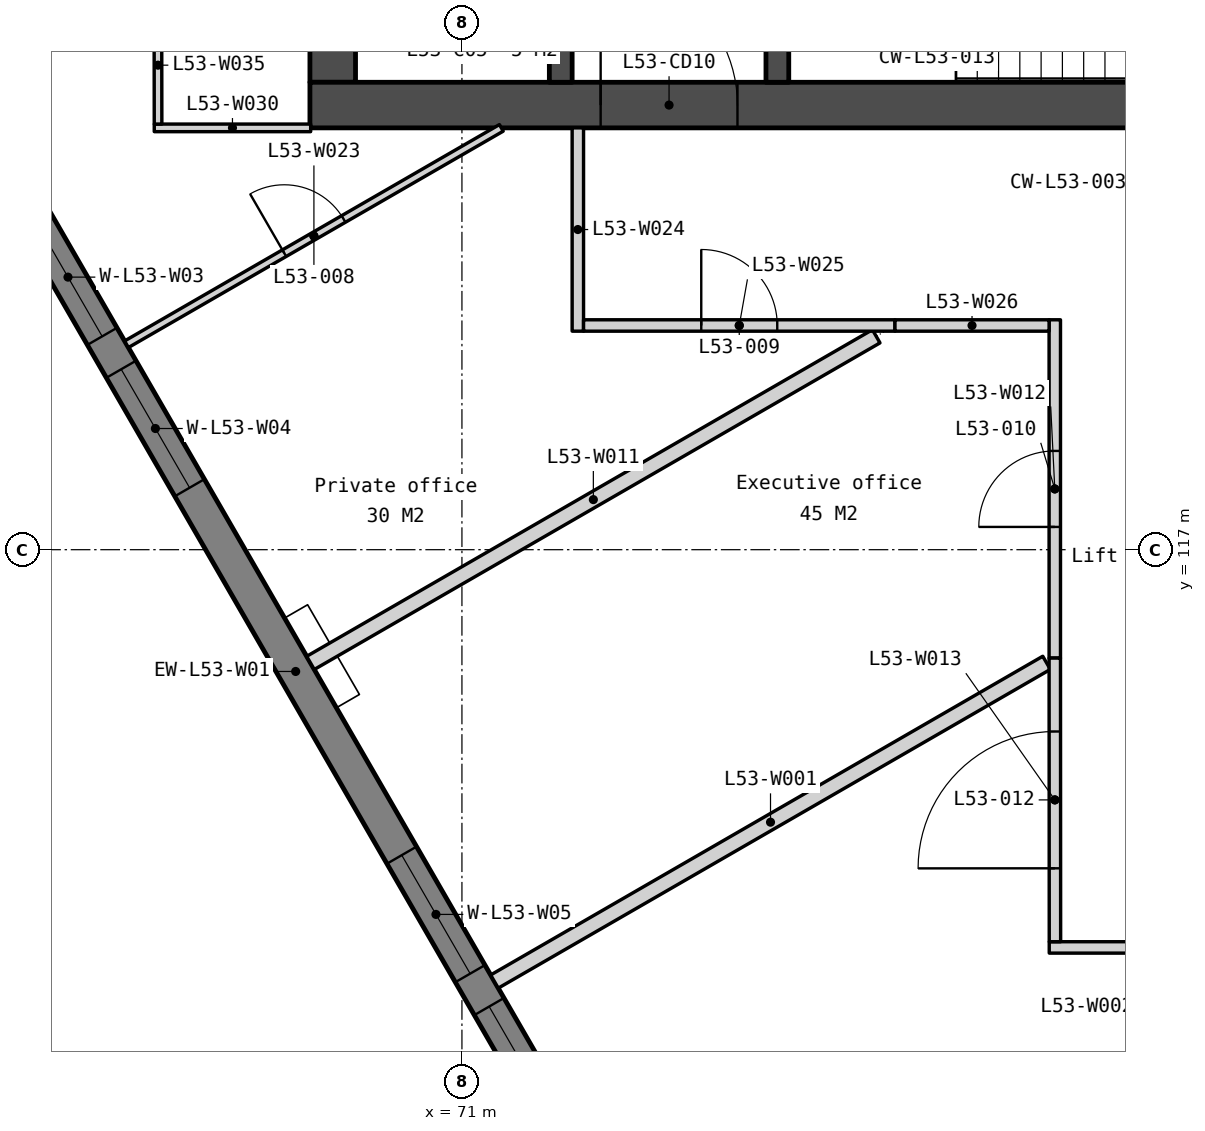
"""IFC4 building model, lengths in metres.
Left out: names, types, materials, properties, quantities, classifications, styles, units other than length and angle.
Written with IfcOpenShell. Run it as: python <this file> out.ifc"""

import sys

from ifc_helpers import new_model, si_unit, direction, frame, frame_2d, origin, place, context, subcontext, project, spatial, polyline, rectangle, outline, extrude, element, fill, save


model = new_model("IFC4")
c1 = context("Model", 3, precision=1e-05, world=origin(), true_north=direction((0.0, 1.0)))
c2 = subcontext(c1, "Body", "Model", "MODEL_VIEW")
j1 = project(units=[si_unit("LENGTHUNIT", "METRE"), si_unit("PLANEANGLEUNIT", "RADIAN")], contexts=[c1])
p1 = place(None, origin())
s1 = spatial("IfcSite", under=j1, at=p1, CompositionType="ELEMENT")
p2 = place(p1, origin())
s2 = spatial("IfcBuilding", under=s1, at=p2, CompositionType="ELEMENT")
p3 = place(p2, frame((0.0, 0.0, 211.4)))
s3 = spatial("IfcBuildingStorey", under=s2, at=p3, CompositionType="ELEMENT", Elevation=211.4)
p4 = place(p3, frame((69.3, 133.95, 0.0), z_axis=(0.0, 0.0, 1.0), x_axis=(0.0, -1.0, 0.0)))
e1 = element("IfcWall", 1, at=p4, inside=s3, PredefinedType="SOLIDWALL", context=c2, shape_type="SweptSolid", body=[
    extrude(rectangle(XDim=10.8, YDim=0.6, at=frame_2d((5.4, 0.0))), origin(), (0.0, 0.0, 1.0), 3.75),
])
p5 = place(p3, frame((69.0, 122.85, 0.0), z_axis=(0.0, 0.0, 1.0), x_axis=(1.0, 0.0, 0.0)))
e2 = element("IfcWall", 2, at=p5, inside=s3, PredefinedType="SOLIDWALL", context=c2, shape_type="SweptSolid", body=[
    extrude(rectangle(XDim=22.0, YDim=0.6, at=frame_2d((11.0, 0.0))), origin(), (0.0, 0.0, 1.0), 3.75),
])
p6 = place(p5, frame((16.375, 0.0, 0.0)))
e3 = element("IfcOpeningElement", 3, at=p6, cuts=e2, PredefinedType="OPENING", context=c2, shape_type="SweptSolid", body=[
    extrude(rectangle(XDim=1.8, YDim=2.1, at=frame_2d((0.9, 1.05))), frame((0.0, 0.31, 0.0), z_axis=(0.0, -1.0, 0.0), x_axis=(1.0, 0.0, 0.0)), (0.0, 0.0, 1.0), 0.62),
])
p7 = place(p5, frame((3.825, 0.0, 0.0)))
e4 = element("IfcOpeningElement", 4, at=p7, cuts=e2, PredefinedType="OPENING", context=c2, shape_type="SweptSolid", body=[
    extrude(rectangle(XDim=1.8, YDim=2.1, at=frame_2d((0.9, 1.05))), frame((0.0, 0.31, 0.0), z_axis=(0.0, -1.0, 0.0), x_axis=(1.0, 0.0, 0.0)), (0.0, 0.0, 1.0), 0.62),
])
p8 = place(p5, frame((12.85, 0.0, 0.0)))
e5 = element("IfcOpeningElement", 5, at=p8, cuts=e2, PredefinedType="OPENING", context=c2, shape_type="SweptSolid", body=[
    extrude(rectangle(XDim=1.5, YDim=2.1, at=frame_2d((0.75, 1.05))), frame((0.0, 0.31, 0.0), z_axis=(0.0, -1.0, 0.0), x_axis=(1.0, 0.0, 0.0)), (0.0, 0.0, 1.0), 0.62),
])
p9 = place(p3, frame((72.3, 133.95, 0.0), z_axis=(0.0, 0.0, 1.0), x_axis=(0.0, -1.0, 0.0)))
e6 = element("IfcWall", 6, at=p9, inside=s3, PredefinedType="SOLIDWALL", context=c2, shape_type="SweptSolid", body=[
    extrude(rectangle(XDim=10.8, YDim=0.3, at=frame_2d((5.4, 0.0))), origin(), (0.0, 0.0, 1.0), 3.75),
])
p10 = place(p9, frame((6.95, 0.0, 0.0)))
e7 = element("IfcOpeningElement", 7, at=p10, cuts=e6, PredefinedType="OPENING", context=c2, shape_type="SweptSolid", body=[
    extrude(rectangle(XDim=1.1, YDim=2.1, at=frame_2d((0.55, 1.05))), frame((0.0, 0.16, 0.0), z_axis=(0.0, -1.0, 0.0), x_axis=(1.0, 0.0, 0.0)), (0.0, 0.0, 1.0), 0.32),
])
p11 = place(p9, frame((9.35, 0.0, 0.0)))
e8 = element("IfcOpeningElement", 8, at=p11, cuts=e6, PredefinedType="OPENING", context=c2, shape_type="SweptSolid", body=[
    extrude(rectangle(XDim=0.9, YDim=2.1, at=frame_2d((0.45, 1.05))), frame((0.0, 0.16, 0.0), z_axis=(0.0, -1.0, 0.0), x_axis=(1.0, 0.0, 0.0)), (0.0, 0.0, 1.0), 0.32),
])
p12 = place(p9, frame((5.1, 0.0, 0.0)))
e9 = element("IfcOpeningElement", 9, at=p12, cuts=e6, PredefinedType="OPENING", context=c2, shape_type="SweptSolid", body=[
    extrude(rectangle(XDim=1.0, YDim=2.1, at=frame_2d((0.5, 1.05))), frame((0.0, 0.16, 0.0), z_axis=(0.0, -1.0, 0.0), x_axis=(1.0, 0.0, 0.0)), (0.0, 0.0, 1.0), 0.32),
])
p13 = place(p3, frame((75.15, 125.7, 0.0), z_axis=(0.0, 0.0, 1.0), x_axis=(0.0, -1.0, 0.0)))
e10 = element("IfcWall", 10, at=p13, inside=s3, PredefinedType="SOLIDWALL", context=c2, shape_type="SweptSolid", body=[
    extrude(rectangle(XDim=2.55, YDim=0.3, at=frame_2d((1.275, 0.0))), origin(), (0.0, 0.0, 1.0), 3.75),
])
p14 = place(p3, frame((59.13, 132.168, -0.15), z_axis=(0.0, 0.0, 1.0), x_axis=(0.500002199942, -0.866024133644, 0.0)))
e11 = element("IfcWall", 11, at=p14, inside=s3, PredefinedType="SOLIDWALL", context=c2, shape_type="SweptSolid", body=[
    extrude(outline(polyline([(38.729, 0.0), (38.729, 3.9), (0.0, 3.9), (0.0, 0.0), (38.729, 0.0)])), frame((0.0, 0.225, 0.0), z_axis=(0.0, -1.0, 0.0), x_axis=(1.0, 0.0, 0.0)), (0.0, 0.0, 1.0), 0.45),
])
p15 = place(p14, frame((2.791, 0.0, 0.95)))
e12 = element("IfcOpeningElement", 12, at=p15, cuts=e11, PredefinedType="OPENING", context=c2, shape_type="SweptSolid", body=[
    extrude(rectangle(XDim=1.8, YDim=2.2, at=frame_2d((0.9, 1.1))), frame((0.0, 0.235, 0.0), z_axis=(0.0, -1.0, 0.0), x_axis=(1.0, 0.0, 0.0)), (0.0, 0.0, 1.0), 0.47),
])
p16 = place(p14, frame((5.091, 0.0, 0.95)))
e13 = element("IfcOpeningElement", 13, at=p16, cuts=e11, PredefinedType="OPENING", context=c2, shape_type="SweptSolid", body=[
    extrude(rectangle(XDim=1.8, YDim=2.2, at=frame_2d((0.9, 1.1))), frame((0.0, 0.235, 0.0), z_axis=(0.0, -1.0, 0.0), x_axis=(1.0, 0.0, 0.0)), (0.0, 0.0, 1.0), 0.47),
])
p17 = place(p14, frame((12.473, 0.0, 0.95)))
e14 = element("IfcOpeningElement", 14, at=p17, cuts=e11, PredefinedType="OPENING", context=c2, shape_type="SweptSolid", body=[
    extrude(rectangle(XDim=1.8, YDim=2.2, at=frame_2d((0.9, 1.1))), frame((0.0, 0.235, 0.0), z_axis=(0.0, -1.0, 0.0), x_axis=(1.0, 0.0, 0.0)), (0.0, 0.0, 1.0), 0.47),
])
p18 = place(p14, frame((14.773, 0.0, 0.95)))
e15 = element("IfcOpeningElement", 15, at=p18, cuts=e11, PredefinedType="OPENING", context=c2, shape_type="SweptSolid", body=[
    extrude(rectangle(XDim=1.8, YDim=2.2, at=frame_2d((0.9, 1.1))), frame((0.0, 0.235, 0.0), z_axis=(0.0, -1.0, 0.0), x_axis=(1.0, 0.0, 0.0)), (0.0, 0.0, 1.0), 0.47),
])
p19 = place(p14, frame((22.156, 0.0, 0.95)))
e16 = element("IfcOpeningElement", 16, at=p19, cuts=e11, PredefinedType="OPENING", context=c2, shape_type="SweptSolid", body=[
    extrude(rectangle(XDim=1.8, YDim=2.2, at=frame_2d((0.9, 1.1))), frame((0.0, 0.235, 0.0), z_axis=(0.0, -1.0, 0.0), x_axis=(1.0, 0.0, 0.0)), (0.0, 0.0, 1.0), 0.47),
])
p20 = place(p14, frame((24.456, 0.0, 0.95)))
e17 = element("IfcOpeningElement", 17, at=p20, cuts=e11, PredefinedType="OPENING", context=c2, shape_type="SweptSolid", body=[
    extrude(rectangle(XDim=1.8, YDim=2.2, at=frame_2d((0.9, 1.1))), frame((0.0, 0.235, 0.0), z_axis=(0.0, -1.0, 0.0), x_axis=(1.0, 0.0, 0.0)), (0.0, 0.0, 1.0), 0.47),
])
p21 = place(p14, frame((31.838, 0.0, 0.95)))
e18 = element("IfcOpeningElement", 18, at=p21, cuts=e11, PredefinedType="OPENING", context=c2, shape_type="SweptSolid", body=[
    extrude(rectangle(XDim=1.8, YDim=2.2, at=frame_2d((0.9, 1.1))), frame((0.0, 0.235, 0.0), z_axis=(0.0, -1.0, 0.0), x_axis=(1.0, 0.0, 0.0)), (0.0, 0.0, 1.0), 0.47),
])
p22 = place(p14, frame((34.138, 0.0, 0.95)))
e19 = element("IfcOpeningElement", 19, at=p22, cuts=e11, PredefinedType="OPENING", context=c2, shape_type="SweptSolid", body=[
    extrude(rectangle(XDim=1.8, YDim=2.2, at=frame_2d((0.9, 1.1))), frame((0.0, 0.235, 0.0), z_axis=(0.0, -1.0, 0.0), x_axis=(1.0, 0.0, 0.0)), (0.0, 0.0, 1.0), 0.47),
])
p23 = place(p3, frame((71.428, 111.318, 0.0), z_axis=(0.0, 0.0, 1.0), x_axis=(0.866016898545, 0.500014731218, 0.0)))
e20 = element("IfcWall", 20, at=p23, inside=s3, PredefinedType="PARTITIONING", context=c2, shape_type="SweptSolid", body=[
    extrude(rectangle(XDim=8.387, YDim=0.2, at=frame_2d((4.194, 0.0))), origin(), (0.0, 0.0, 1.0), 3.75),
])
p24 = place(p3, frame((78.727, 111.767, 0.0), z_axis=(0.0, 0.0, 1.0), x_axis=(1.0, 0.0, 0.0)))
e21 = element("IfcWall", 21, at=p24, inside=s3, PredefinedType="PARTITIONING", context=c2, shape_type="SweptSolid", body=[
    extrude(rectangle(XDim=2.546, YDim=0.15, at=frame_2d((1.273, 0.0))), origin(), (0.0, 0.0, 1.0), 3.75),
])
p25 = place(p3, frame((69.007, 115.51, 0.0), z_axis=(0.0, 0.0, 1.0), x_axis=(0.866033739143, 0.499985562458, 0.0)))
e22 = element("IfcWall", 22, at=p25, inside=s3, PredefinedType="PARTITIONING", context=c2, shape_type="SweptSolid", body=[
    extrude(rectangle(XDim=8.594, YDim=0.2, at=frame_2d((4.297, 0.0))), origin(), (0.0, 0.0, 1.0), 3.75),
])
p26 = place(p3, frame((78.8, 115.574, 0.0), z_axis=(0.0, 0.0, 1.0), x_axis=(0.0, 1.0, 0.0)))
e23 = element("IfcWall", 23, at=p26, inside=s3, PredefinedType="PARTITIONING", context=c2, shape_type="SweptSolid", body=[
    extrude(rectangle(XDim=4.451, YDim=0.15, at=frame_2d((2.226, 0.0))), origin(), (0.0, 0.0, 1.0), 3.75),
])
p27 = place(p26, frame((1.726, 0.0, 0.0)))
e24 = element("IfcOpeningElement", 24, at=p27, cuts=e23, PredefinedType="OPENING", context=c2, shape_type="SweptSolid", body=[
    extrude(rectangle(XDim=1.0, YDim=2.1, at=frame_2d((0.5, 1.05))), frame((0.0, 0.085, 0.0), z_axis=(0.0, -1.0, 0.0), x_axis=(1.0, 0.0, 0.0)), (0.0, 0.0, 1.0), 0.17),
])
p28 = place(p3, frame((78.802, 111.842, 0.0), z_axis=(0.0, 0.0, 1.0), x_axis=(-0.000523320397, 0.999999863068, 0.0)))
e25 = element("IfcWall", 25, at=p28, inside=s3, PredefinedType="PARTITIONING", context=c2, shape_type="SweptSolid", body=[
    extrude(rectangle(XDim=3.732, YDim=0.15, at=frame_2d((1.866, 0.0))), origin(), (0.0, 0.0, 1.0), 3.75),
])
p29 = place(p28, frame((0.966, 0.0, 0.0)))
e26 = element("IfcOpeningElement", 26, at=p29, cuts=e25, PredefinedType="OPENING", context=c2, shape_type="SweptSolid", body=[
    extrude(rectangle(XDim=1.8, YDim=2.1, at=frame_2d((0.9, 1.05))), frame((0.0, 0.085, 0.0), z_axis=(0.0, -1.0, 0.0), x_axis=(1.0, 0.0, 0.0)), (0.0, 0.0, 1.0), 0.17),
])
p30 = place(p3, frame((66.587, 119.703, 0.0), z_axis=(0.0, 0.0, 1.0), x_axis=(0.866023511746, 0.500003277092, 0.0)))
e27 = element("IfcWall", 27, at=p30, inside=s3, PredefinedType="PARTITIONING", context=c2, shape_type="SweptSolid", body=[
    extrude(rectangle(XDim=5.694, YDim=0.1, at=frame_2d((2.847, 0.0))), origin(), (0.0, 0.0, 1.0), 3.75),
])
p31 = place(p30, frame((2.397, 0.0, 0.0)))
e28 = element("IfcOpeningElement", 28, at=p31, cuts=e27, PredefinedType="OPENING", context=c2, shape_type="SweptSolid", body=[
    extrude(rectangle(XDim=0.9, YDim=2.1, at=frame_2d((0.45, 1.05))), frame((0.0, 0.06, 0.0), z_axis=(0.0, -1.0, 0.0), x_axis=(1.0, 0.0, 0.0)), (0.0, 0.0, 1.0), 0.12),
])
p32 = place(p3, frame((72.525, 119.875, 0.0), z_axis=(0.0, 0.0, 1.0), x_axis=(0.0, 1.0, 0.0)))
e29 = element("IfcWall", 29, at=p32, inside=s3, PredefinedType="PARTITIONING", context=c2, shape_type="SweptSolid", body=[
    extrude(rectangle(XDim=2.675, YDim=0.15, at=frame_2d((1.337, 0.0))), origin(), (0.0, 0.0, 1.0), 3.75),
])
p33 = place(p3, frame((72.6, 119.95, 0.0), z_axis=(0.0, 0.0, 1.0), x_axis=(1.0, 0.0, 0.0)))
e30 = element("IfcWall", 30, at=p33, inside=s3, PredefinedType="PARTITIONING", context=c2, shape_type="SweptSolid", body=[
    extrude(rectangle(XDim=4.097, YDim=0.15, at=frame_2d((2.049, 0.0))), origin(), (0.0, 0.0, 1.0), 3.75),
])
p34 = place(p33, frame((1.549, 0.0, 0.0)))
e31 = element("IfcOpeningElement", 31, at=p34, cuts=e30, PredefinedType="OPENING", context=c2, shape_type="SweptSolid", body=[
    extrude(rectangle(XDim=1.0, YDim=2.1, at=frame_2d((0.5, 1.05))), frame((0.0, 0.085, 0.0), z_axis=(0.0, -1.0, 0.0), x_axis=(1.0, 0.0, 0.0)), (0.0, 0.0, 1.0), 0.17),
])
p35 = place(p3, frame((76.697, 119.95, 0.0), z_axis=(0.0, 0.0, 1.0), x_axis=(1.0, 0.0, 0.0)))
e32 = element("IfcWall", 32, at=p35, inside=s3, PredefinedType="PARTITIONING", context=c2, shape_type="SweptSolid", body=[
    extrude(rectangle(XDim=2.028, YDim=0.15, at=frame_2d((1.014, 0.0))), origin(), (0.0, 0.0, 1.0), 3.75),
])
p36 = place(p3, frame((66.952, 122.55, 0.0), z_axis=(0.0, 0.0, 1.0), x_axis=(1.0, 0.0, 0.0)))
e33 = element("IfcWall", 33, at=p36, inside=s3, PredefinedType="PARTITIONING", context=c2, shape_type="SweptSolid", body=[
    extrude(rectangle(XDim=2.058, YDim=0.1, at=frame_2d((1.029, 0.0))), origin(), (0.0, 0.0, 1.0), 3.75),
])
p37 = place(p3, frame((67.002, 122.6, 0.0), z_axis=(0.0, 0.0, 1.0), x_axis=(-0.001260238445, 0.999999205899, 0.0)))
e34 = element("IfcWall", 34, at=p37, inside=s3, PredefinedType="PARTITIONING", context=c2, shape_type="SweptSolid", body=[
    extrude(rectangle(XDim=1.55, YDim=0.1, at=frame_2d((0.775, 0.0))), origin(), (0.0, 0.0, 1.0), 3.75),
])
p38 = place(p7, origin())
e35 = element("IfcDoor", 35, at=p38, inside=s3, OperationType="DOUBLE_DOOR_DOUBLE_SWING", PredefinedType="DOOR", context=c2, shape_type="SweptSolid", body=[
    extrude(rectangle(XDim=1.8, YDim=2.1, at=frame_2d((0.9, 1.05))), frame((0.0, 0.025, 0.0), z_axis=(0.0, -1.0, 0.0), x_axis=(1.0, 0.0, 0.0)), (0.0, 0.0, 1.0), 0.05),
])
fill(e4, e35)
p39 = place(p17, origin())
e36 = element("IfcWindow", 36, at=p39, inside=s3, PartitioningType="SINGLE_PANEL", PredefinedType="WINDOW", context=c2, shape_type="SweptSolid", body=[
    extrude(rectangle(XDim=1.8, YDim=2.2, at=frame_2d((0.9, 1.1))), frame((0.0, 0.03, 0.0), z_axis=(0.0, -1.0, 0.0), x_axis=(1.0, 0.0, 0.0)), (0.0, 0.0, 1.0), 0.06),
])
fill(e14, e36)
p40 = place(p18, origin())
e37 = element("IfcWindow", 37, at=p40, inside=s3, PartitioningType="SINGLE_PANEL", PredefinedType="WINDOW", context=c2, shape_type="SweptSolid", body=[
    extrude(rectangle(XDim=1.8, YDim=2.2, at=frame_2d((0.9, 1.1))), frame((0.0, 0.03, 0.0), z_axis=(0.0, -1.0, 0.0), x_axis=(1.0, 0.0, 0.0)), (0.0, 0.0, 1.0), 0.06),
])
fill(e15, e37)
p41 = place(p19, origin())
e38 = element("IfcWindow", 38, at=p41, inside=s3, PartitioningType="SINGLE_PANEL", PredefinedType="WINDOW", context=c2, shape_type="SweptSolid", body=[
    extrude(rectangle(XDim=1.8, YDim=2.2, at=frame_2d((0.9, 1.1))), frame((0.0, 0.03, 0.0), z_axis=(0.0, -1.0, 0.0), x_axis=(1.0, 0.0, 0.0)), (0.0, 0.0, 1.0), 0.06),
])
fill(e16, e38)
p42 = place(p20, origin())
e39 = element("IfcWindow", 39, at=p42, inside=s3, PartitioningType="SINGLE_PANEL", PredefinedType="WINDOW", context=c2, shape_type="SweptSolid", body=[
    extrude(rectangle(XDim=1.8, YDim=2.2, at=frame_2d((0.9, 1.1))), frame((0.0, 0.03, 0.0), z_axis=(0.0, -1.0, 0.0), x_axis=(1.0, 0.0, 0.0)), (0.0, 0.0, 1.0), 0.06),
])
fill(e17, e39)
p43 = place(p31, origin())
e40 = element("IfcDoor", 40, at=p43, inside=s3, OperationType="SINGLE_SWING_LEFT", PredefinedType="DOOR", context=c2, shape_type="SweptSolid", body=[
    extrude(rectangle(XDim=0.9, YDim=2.1, at=frame_2d((0.45, 1.05))), frame((0.0, 0.025, 0.0), z_axis=(0.0, -1.0, 0.0), x_axis=(1.0, 0.0, 0.0)), (0.0, 0.0, 1.0), 0.05),
])
fill(e28, e40)
p44 = place(p34, origin())
e41 = element("IfcDoor", 41, at=p44, inside=s3, OperationType="SINGLE_SWING_LEFT", PredefinedType="DOOR", context=c2, shape_type="SweptSolid", body=[
    extrude(rectangle(XDim=1.0, YDim=2.1, at=frame_2d((0.5, 1.05))), frame((0.0, 0.025, 0.0), z_axis=(0.0, -1.0, 0.0), x_axis=(1.0, 0.0, 0.0)), (0.0, 0.0, 1.0), 0.05),
])
fill(e31, e41)
p45 = place(p27, origin())
e42 = element("IfcDoor", 42, at=p45, inside=s3, OperationType="SINGLE_SWING_LEFT", PredefinedType="DOOR", context=c2, shape_type="SweptSolid", body=[
    extrude(rectangle(XDim=1.0, YDim=2.1, at=frame_2d((0.5, 1.05))), frame((0.0, 0.025, 0.0), z_axis=(0.0, -1.0, 0.0), x_axis=(1.0, 0.0, 0.0)), (0.0, 0.0, 1.0), 0.05),
])
fill(e24, e42)
p46 = place(p29, origin())
e43 = element("IfcDoor", 43, at=p46, inside=s3, OperationType="SINGLE_SWING_LEFT", PredefinedType="DOOR", context=c2, shape_type="SweptSolid", body=[
    extrude(rectangle(XDim=1.8, YDim=2.1, at=frame_2d((0.9, 1.05))), frame((0.0, 0.025, 0.0), z_axis=(0.0, -1.0, 0.0), x_axis=(1.0, 0.0, 0.0)), (0.0, 0.0, 1.0), 0.05),
])
fill(e26, e43)
save(model, sys.argv[1])
